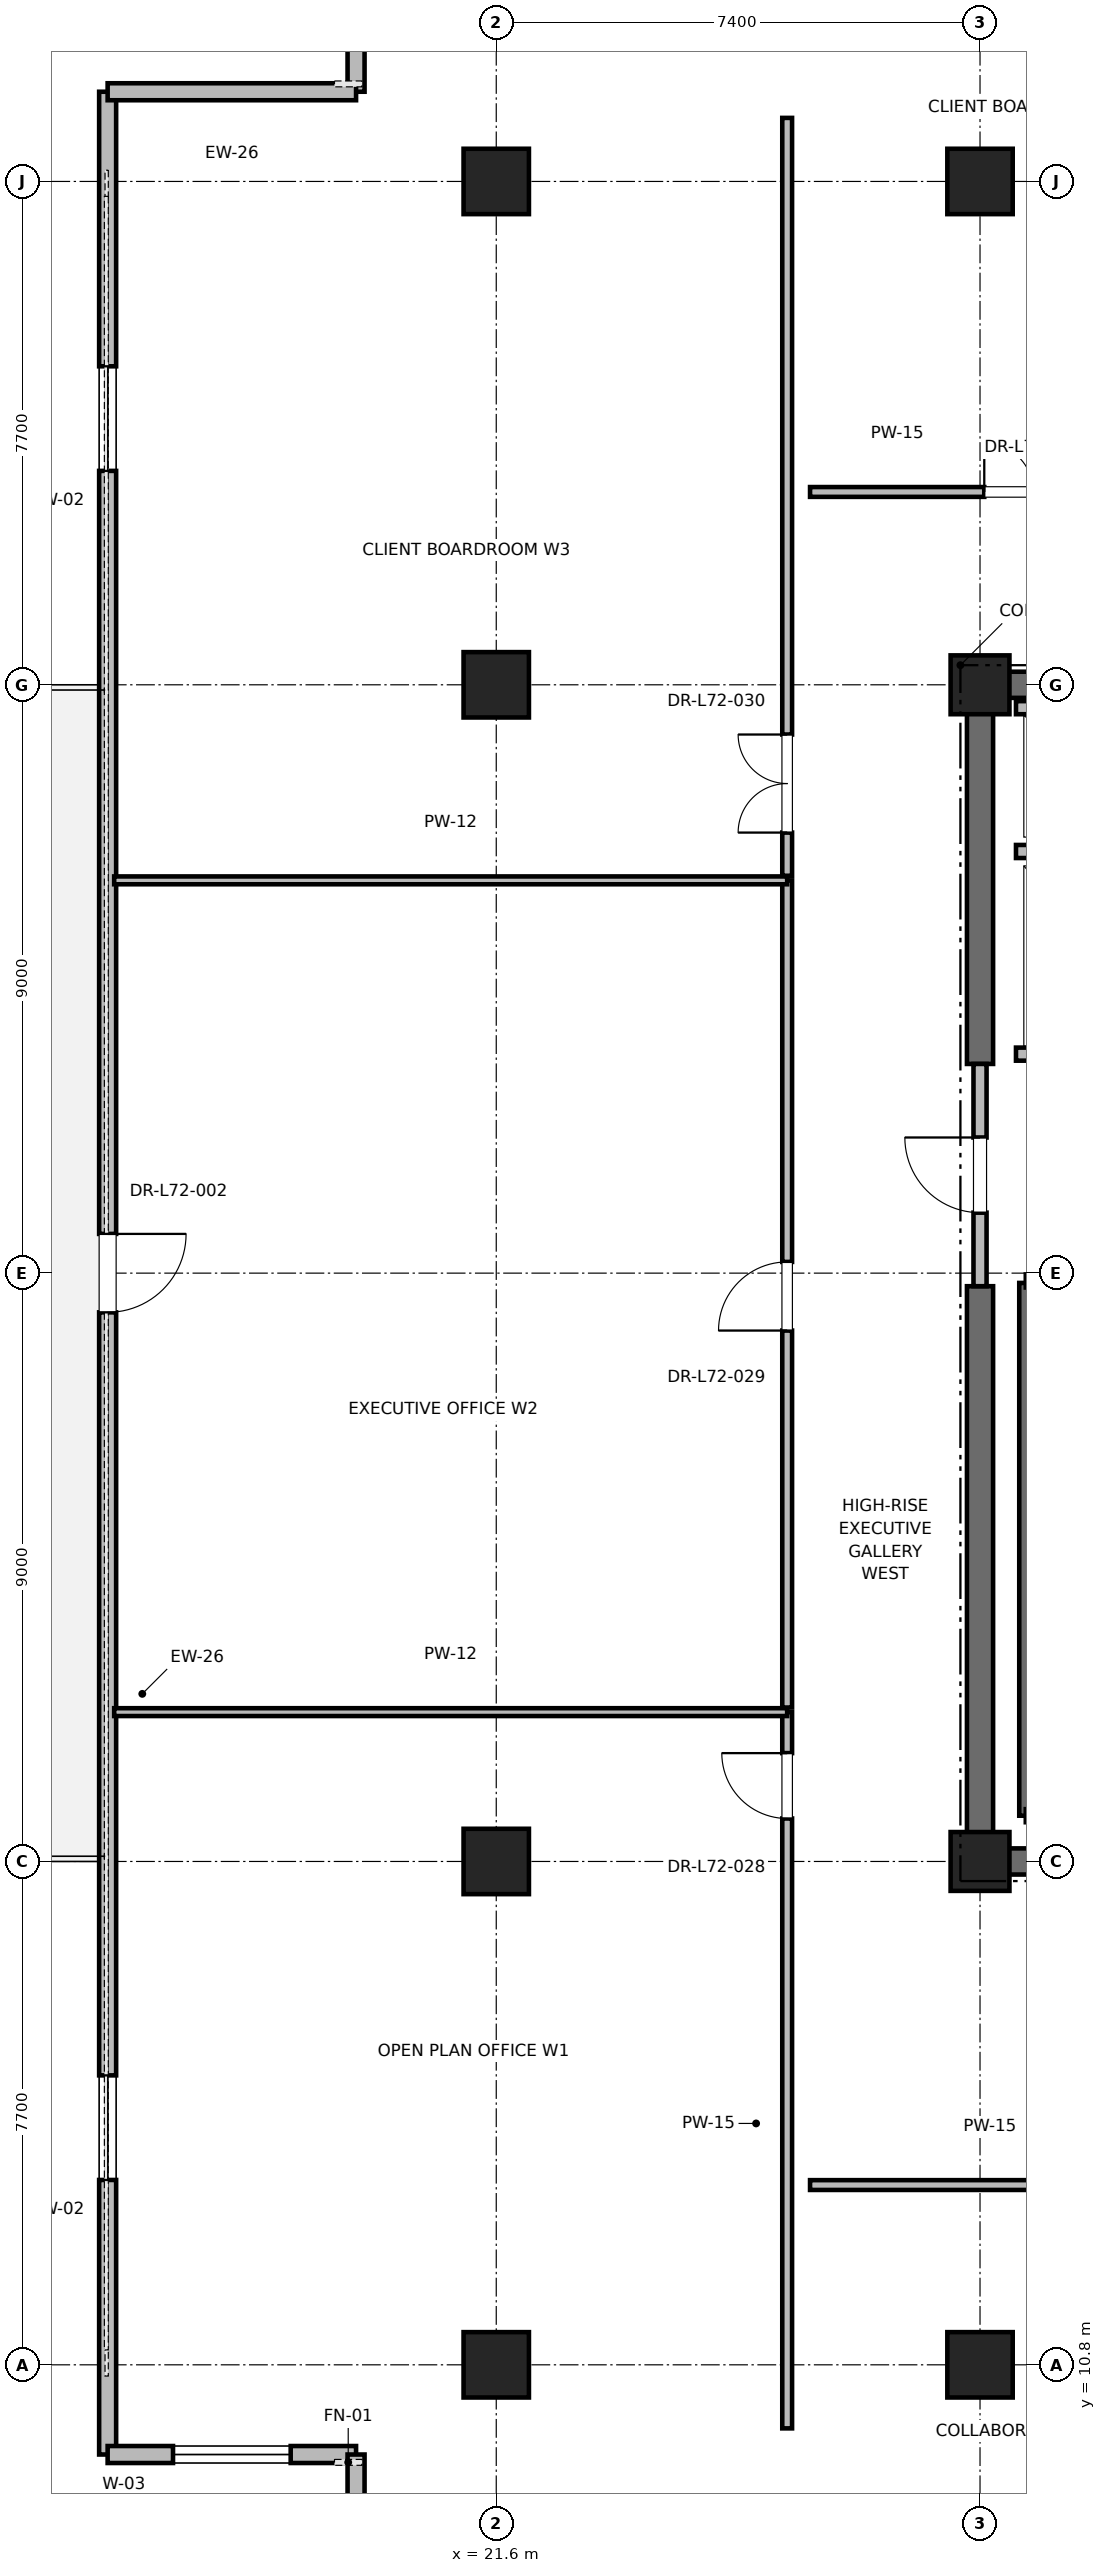
"""IFC4 building model, lengths in metres.
Left out: names, types, materials, properties, quantities, classifications, styles, units other than length and angle.
Written with IfcOpenShell. Run it as: python <this file> out.ifc"""

import sys

from ifc_helpers import new_model, si_unit, direction, frame, frame_2d, origin, origin_2d, place, context, subcontext, project, spatial, rectangle, extrude, element, fill, save


model = new_model("IFC4")
c1 = context("Model", 3, precision=1e-05, world=origin(), true_north=direction((0.0, 1.0)))
c2 = subcontext(c1, "Body", "Model", "MODEL_VIEW")
j1 = project(units=[si_unit("LENGTHUNIT", "METRE"), si_unit("PLANEANGLEUNIT", "RADIAN")], contexts=[c1])
p1 = place(None, origin())
s1 = spatial("IfcSite", under=j1, at=p1, CompositionType="ELEMENT")
p2 = place(p1, origin())
s2 = spatial("IfcBuilding", under=s1, at=p2, CompositionType="ELEMENT")
p3 = place(p2, frame((0.0, 0.0, 310.8)))
s3 = spatial("IfcBuildingStorey", under=s2, at=p3, CompositionType="ELEMENT", Elevation=310.8)
for number, where, z_axis, x_axis in (
    (1, (29.0, 10.8, 0.0), (0.0, 0.0, 1.0), (1.0, 0.0, 0.0)),
    (2, (29.0, 44.2, 0.0), (0.0, 0.0, 1.0), (1.0, 0.0, 0.0)),
    (3, (21.6, 18.5, 0.0), (0.0, 0.0, 1.0), (1.0, 0.0, 0.0)),
    (4, (21.6, 36.5, 0.0), (0.0, 0.0, 1.0), (1.0, 0.0, 0.0)),
    (5, (21.6, 10.8, 0.0), (0.0, 0.0, 1.0), (1.0, 0.0, 0.0)),
    (6, (21.6, 44.2, 0.0), (0.0, 0.0, 1.0), (1.0, 0.0, 0.0)),
):
    element("IfcColumn", number, at=place(p3, frame(where, z_axis=z_axis, x_axis=x_axis)), inside=s3, PredefinedType="COLUMN", context=c2, shape_type="SweptSolid", body=[
        extrude(rectangle(XDim=1.0, YDim=1.0, at=origin_2d()), origin(), (0.0, 0.0, 1.0), 4.0),
    ])
for number, where, z_axis, x_axis in (
    (7, (29.0, 18.5, 0.0), (0.0, 0.0, 1.0), (1.0, 0.0, 0.0)),
    (8, (29.0, 36.5, 0.0), (0.0, 0.0, 1.0), (1.0, 0.0, 0.0)),
):
    element("IfcColumn", number, at=place(p3, frame(where, z_axis=z_axis, x_axis=x_axis)), inside=s3, PredefinedType="PILASTER", context=c2, shape_type="SweptSolid", body=[
        extrude(rectangle(XDim=0.9, YDim=0.9, at=origin_2d()), origin(), (0.0, 0.0, 1.0), 4.0),
    ])
p4 = place(p3, frame((29.0, 18.5, 0.0), z_axis=(0.0, 0.0, 1.0), x_axis=(1.0, 0.0, 0.0)))
e9 = element("IfcWall", 9, at=p4, inside=s3, PredefinedType="SHEAR", context=c2, shape_type="SweptSolid", body=[
    extrude(rectangle(XDim=9.2, YDim=0.4, at=frame_2d((4.6, 0.0))), origin(), (0.0, 0.0, 1.0), 3.785),
])
p5 = place(p3, frame((29.0, 36.5, 0.0), z_axis=(0.0, 0.0, 1.0), x_axis=(1.0, 0.0, 0.0)))
e10 = element("IfcWall", 10, at=p5, inside=s3, PredefinedType="SHEAR", context=c2, shape_type="SweptSolid", body=[
    extrude(rectangle(XDim=5.8, YDim=0.4, at=frame_2d((2.9, 0.0))), origin(), (0.0, 0.0, 1.0), 3.785),
])
p6 = place(p3, frame((29.0, 18.5, 0.0), z_axis=(0.0, 0.0, 1.0), x_axis=(0.0, 1.0, 0.0)))
e11 = element("IfcWall", 11, at=p6, inside=s3, PredefinedType="SHEAR", context=c2, shape_type="SweptSolid", body=[
    extrude(rectangle(XDim=8.8, YDim=0.4, at=frame_2d((4.4, 0.0))), origin(), (0.0, 0.0, 1.0), 3.785),
])
p7 = place(p3, frame((29.0, 30.7, 0.0), z_axis=(0.0, 0.0, 1.0), x_axis=(0.0, 1.0, 0.0)))
e12 = element("IfcWall", 12, at=p7, inside=s3, PredefinedType="SHEAR", context=c2, shape_type="SweptSolid", body=[
    extrude(rectangle(XDim=5.8, YDim=0.4, at=frame_2d((2.9, 0.0))), origin(), (0.0, 0.0, 1.0), 3.785),
])
p8 = place(p3, frame((15.656, 45.572, 0.0), z_axis=(0.0, 0.0, 1.0), x_axis=(0.0, -1.0, 0.0)))
e13 = element("IfcWall", 13, at=p8, inside=s3, PredefinedType="PARAPET", context=c2, shape_type="SweptSolid", body=[
    extrude(rectangle(XDim=36.145, YDim=0.26, at=frame_2d((18.072, 0.0))), origin(), (0.0, 0.0, 1.0), 3.196),
])
p9 = place(p8, frame((4.2, 0.0, 0.85)))
e14 = element("IfcOpeningElement", 14, at=p9, cuts=e13, PredefinedType="OPENING", context=c2, shape_type="SweptSolid", body=[
    extrude(rectangle(XDim=1.6, YDim=2.1, at=frame_2d((0.8, 1.05))), frame((0.0, 0.13, 0.0), z_axis=(0.0, -1.0, 0.0), x_axis=(1.0, 0.0, 0.0)), (0.0, 0.0, 1.0), 0.26),
])
p10 = place(p8, frame((17.472, 0.0, 0.0)))
e15 = element("IfcOpeningElement", 15, at=p10, cuts=e13, PredefinedType="OPENING", context=c2, shape_type="SweptSolid", body=[
    extrude(rectangle(XDim=1.2, YDim=2.2, at=frame_2d((0.6, 1.1))), frame((0.0, 0.13, 0.0), z_axis=(0.0, -1.0, 0.0), x_axis=(1.0, 0.0, 0.0)), (0.0, 0.0, 1.0), 0.26),
])
p11 = place(p8, frame((30.344, 0.0, 0.85)))
e16 = element("IfcOpeningElement", 16, at=p11, cuts=e13, PredefinedType="OPENING", context=c2, shape_type="SweptSolid", body=[
    extrude(rectangle(XDim=1.6, YDim=2.1, at=frame_2d((0.8, 1.05))), frame((0.0, 0.13, 0.0), z_axis=(0.0, -1.0, 0.0), x_axis=(1.0, 0.0, 0.0)), (0.0, 0.0, 1.0), 0.26),
])
p12 = place(p3, frame((15.656, 9.428, 0.0), z_axis=(0.0, 0.0, 1.0), x_axis=(1.0, 0.0, 0.0)))
e17 = element("IfcWall", 17, at=p12, inside=s3, PredefinedType="PARAPET", context=c2, shape_type="SweptSolid", body=[
    extrude(rectangle(XDim=3.8, YDim=0.26, at=frame_2d((1.9, 0.0))), origin(), (0.0, 0.0, 1.0), 3.785),
])
p13 = place(p12, frame((1.0, 0.0, 0.85)))
e18 = element("IfcOpeningElement", 18, at=p13, cuts=e17, PredefinedType="OPENING", context=c2, shape_type="SweptSolid", body=[
    extrude(rectangle(XDim=1.8, YDim=2.2, at=frame_2d((0.9, 1.1))), frame((0.0, 0.13, 0.0), z_axis=(0.0, -1.0, 0.0), x_axis=(1.0, 0.0, 0.0)), (0.0, 0.0, 1.0), 0.26),
])
p14 = place(p3, frame((19.456, 9.428, 0.0), z_axis=(0.0, 0.0, 1.0), x_axis=(0.0, -1.0, 0.0)))
e19 = element("IfcWall", 19, at=p14, inside=s3, PredefinedType="PARAPET", context=c2, shape_type="SweptSolid", body=[
    extrude(rectangle(XDim=3.3, YDim=0.26, at=frame_2d((1.65, 0.0))), origin(), (0.0, 0.0, 1.0), 3.785),
])
p15 = place(p3, frame((19.456, 48.872, 0.0), z_axis=(0.0, 0.0, 1.0), x_axis=(0.0, -1.0, 0.0)))
e20 = element("IfcWall", 20, at=p15, inside=s3, PredefinedType="PARAPET", context=c2, shape_type="SweptSolid", body=[
    extrude(rectangle(XDim=3.3, YDim=0.26, at=frame_2d((1.65, 0.0))), origin(), (0.0, 0.0, 1.0), 3.785),
])
p16 = place(p15, frame((0.75, 0.0, 0.85)))
e21 = element("IfcOpeningElement", 21, at=p16, cuts=e20, PredefinedType="OPENING", context=c2, shape_type="SweptSolid", body=[
    extrude(rectangle(XDim=1.8, YDim=2.2, at=frame_2d((0.9, 1.1))), frame((0.0, 0.13, 0.0), z_axis=(0.0, -1.0, 0.0), x_axis=(1.0, 0.0, 0.0)), (0.0, 0.0, 1.0), 0.26),
])
p17 = place(p3, frame((19.456, 45.572, 0.0), z_axis=(0.0, 0.0, 1.0), x_axis=(-1.0, 0.0, 0.0)))
e22 = element("IfcWall", 22, at=p17, inside=s3, PredefinedType="PARAPET", context=c2, shape_type="SweptSolid", body=[
    extrude(rectangle(XDim=3.8, YDim=0.26, at=frame_2d((1.9, 0.0))), origin(), (0.0, 0.0, 1.0), 3.785),
])
p18 = place(p3, frame((29.7, 19.2, 0.0), z_axis=(0.0, 0.0, 1.0), x_axis=(0.0, 1.0, 0.0)))
e23 = element("IfcWall", 23, at=p18, inside=s3, PredefinedType="SOLIDWALL", context=c2, shape_type="SweptSolid", body=[
    extrude(rectangle(XDim=8.15, YDim=0.2, at=frame_2d((4.075, 0.0))), origin(), (0.0, 0.0, 1.0), 3.785),
])
p19 = place(p3, frame((29.0, 27.3, 0.0), z_axis=(0.0, 0.0, 1.0), x_axis=(0.0, 1.0, 0.0)))
e24 = element("IfcWall", 24, at=p19, inside=s3, PredefinedType="PARTITIONING", context=c2, shape_type="SweptSolid", body=[
    extrude(rectangle(XDim=3.4, YDim=0.2, at=frame_2d((1.7, 0.0))), origin(), (0.0, 0.0, 1.0), 2.865),
])
p20 = place(p19, frame((1.125, 0.0, 0.0)))
e25 = element("IfcOpeningElement", 25, at=p20, cuts=e24, PredefinedType="OPENING", context=c2, shape_type="SweptSolid", body=[
    extrude(rectangle(XDim=1.15, YDim=2.2, at=frame_2d((0.575, 1.1))), frame((0.0, 0.1, 0.0), z_axis=(0.0, -1.0, 0.0), x_axis=(1.0, 0.0, 0.0)), (0.0, 0.0, 1.0), 0.2),
])
p21 = place(p3, frame((29.55, 30.85, 0.0), z_axis=(0.0, 0.0, 1.0), x_axis=(1.0, 0.0, 0.0)))
e26 = element("IfcWall", 26, at=p21, inside=s3, PredefinedType="SOLIDWALL", context=c2, shape_type="SweptSolid", body=[
    extrude(rectangle(XDim=2.6, YDim=0.2, at=frame_2d((1.3, 0.0))), origin(), (0.0, 0.0, 1.0), 2.865),
])
p22 = place(p21, frame((0.75, 0.0, 0.0)))
e27 = element("IfcOpeningElement", 27, at=p22, cuts=e26, PredefinedType="OPENING", context=c2, shape_type="SweptSolid", body=[
    extrude(rectangle(XDim=1.1, YDim=2.2, at=frame_2d((0.55, 1.1))), frame((0.0, 0.1, 0.0), z_axis=(0.0, -1.0, 0.0), x_axis=(1.0, 0.0, 0.0)), (0.0, 0.0, 1.0), 0.2),
])
p23 = place(p3, frame((29.55, 33.95, 0.0), z_axis=(0.0, 0.0, 1.0), x_axis=(1.0, 0.0, 0.0)))
e28 = element("IfcWall", 28, at=p23, inside=s3, PredefinedType="SOLIDWALL", context=c2, shape_type="SweptSolid", body=[
    extrude(rectangle(XDim=2.8, YDim=0.2, at=frame_2d((1.4, 0.0))), origin(), (0.0, 0.0, 1.0), 3.785),
])
p24 = place(p3, frame((32.35, 36.15, 0.0), z_axis=(0.0, 0.0, 1.0), x_axis=(-1.0, 0.0, 0.0)))
e29 = element("IfcWall", 29, at=p24, inside=s3, PredefinedType="SOLIDWALL", context=c2, shape_type="SweptSolid", body=[
    extrude(rectangle(XDim=2.8, YDim=0.2, at=frame_2d((1.4, 0.0))), origin(), (0.0, 0.0, 1.0), 3.22),
])
p25 = place(p3, frame((26.4, 39.45, 0.0), z_axis=(0.0, 0.0, 1.0), x_axis=(1.0, 0.0, 0.0)))
e30 = element("IfcWall", 30, at=p25, inside=s3, PredefinedType="PARTITIONING", context=c2, shape_type="SweptSolid", body=[
    extrude(rectangle(XDim=6.8, YDim=0.15, at=frame_2d((3.4, 0.0))), origin(), (0.0, 0.0, 1.0), 2.85),
])
p26 = place(p25, frame((2.665, 0.0, 0.0)))
e31 = element("IfcOpeningElement", 31, at=p26, cuts=e30, PredefinedType="OPENING", context=c2, shape_type="SweptSolid", body=[
    extrude(rectangle(XDim=1.5, YDim=2.25, at=frame_2d((0.75, 1.125))), frame((0.0, 0.075, 0.0), z_axis=(0.0, -1.0, 0.0), x_axis=(1.0, 0.0, 0.0)), (0.0, 0.0, 1.0), 0.15),
])
p27 = place(p3, frame((26.4, 13.55, 0.0), z_axis=(0.0, 0.0, 1.0), x_axis=(1.0, 0.0, 0.0)))
e32 = element("IfcWall", 32, at=p27, inside=s3, PredefinedType="PARTITIONING", context=c2, shape_type="SweptSolid", body=[
    extrude(rectangle(XDim=11.968, YDim=0.15, at=frame_2d((5.984, 0.0))), origin(), (0.0, 0.0, 1.0), 2.85),
])
p28 = place(p27, frame((5.499, 0.0, 0.0)))
e33 = element("IfcOpeningElement", 33, at=p28, cuts=e32, PredefinedType="OPENING", context=c2, shape_type="SweptSolid", body=[
    extrude(rectangle(XDim=1.0, YDim=2.15, at=frame_2d((0.5, 1.075))), frame((0.0, 0.075, 0.0), z_axis=(0.0, -1.0, 0.0), x_axis=(1.0, 0.0, 0.0)), (0.0, 0.0, 1.0), 0.15),
])
p29 = place(p3, frame((26.05, 9.828, 0.0), z_axis=(0.0, 0.0, 1.0), x_axis=(0.0, 1.0, 0.0)))
e34 = element("IfcWall", 34, at=p29, inside=s3, PredefinedType="PARTITIONING", context=c2, shape_type="SweptSolid", body=[
    extrude(rectangle(XDim=10.957, YDim=0.15, at=frame_2d((5.479, 0.0))), origin(), (0.0, 0.0, 1.0), 2.85),
])
p30 = place(p29, frame((9.33, 0.0, 0.0)))
e35 = element("IfcOpeningElement", 35, at=p30, cuts=e34, PredefinedType="OPENING", context=c2, shape_type="SweptSolid", body=[
    extrude(rectangle(XDim=1.0, YDim=2.15, at=frame_2d((0.5, 1.075))), frame((0.0, 0.075, 0.0), z_axis=(0.0, -1.0, 0.0), x_axis=(1.0, 0.0, 0.0)), (0.0, 0.0, 1.0), 0.15),
])
p31 = place(p3, frame((15.756, 20.785, 0.0), z_axis=(0.0, 0.0, 1.0), x_axis=(1.0, 0.0, 0.0)))
e36 = element("IfcWall", 36, at=p31, inside=s3, PredefinedType="PARTITIONING", context=c2, shape_type="SweptSolid", body=[
    extrude(rectangle(XDim=10.294, YDim=0.12, at=frame_2d((5.147, 0.0))), origin(), (0.0, 0.0, 1.0), 2.85),
])
p32 = place(p3, frame((26.05, 20.854, 0.0), z_axis=(0.0, 0.0, 1.0), x_axis=(0.0, 1.0, 0.0)))
e37 = element("IfcWall", 37, at=p32, inside=s3, PredefinedType="PARTITIONING", context=c2, shape_type="SweptSolid", body=[
    extrude(rectangle(XDim=12.654, YDim=0.15, at=frame_2d((6.327, 0.0))), origin(), (0.0, 0.0, 1.0), 2.85),
])
p33 = place(p32, frame((5.767, 0.0, 0.0)))
e38 = element("IfcOpeningElement", 38, at=p33, cuts=e37, PredefinedType="OPENING", context=c2, shape_type="SweptSolid", body=[
    extrude(rectangle(XDim=1.05, YDim=2.2, at=frame_2d((0.525, 1.1))), frame((0.0, 0.075, 0.0), z_axis=(0.0, -1.0, 0.0), x_axis=(1.0, 0.0, 0.0)), (0.0, 0.0, 1.0), 0.15),
])
p34 = place(p3, frame((15.756, 33.509, 0.0), z_axis=(0.0, 0.0, 1.0), x_axis=(1.0, 0.0, 0.0)))
e39 = element("IfcWall", 39, at=p34, inside=s3, PredefinedType="PARTITIONING", context=c2, shape_type="SweptSolid", body=[
    extrude(rectangle(XDim=10.294, YDim=0.12, at=frame_2d((5.147, 0.0))), origin(), (0.0, 0.0, 1.0), 2.85),
])
p35 = place(p3, frame((26.05, 33.579, 0.0), z_axis=(0.0, 0.0, 1.0), x_axis=(0.0, 1.0, 0.0)))
e40 = element("IfcWall", 40, at=p35, inside=s3, PredefinedType="PARTITIONING", context=c2, shape_type="SweptSolid", body=[
    extrude(rectangle(XDim=11.594, YDim=0.15, at=frame_2d((5.797, 0.0))), origin(), (0.0, 0.0, 1.0), 2.85),
])
p36 = place(p35, frame((0.661, 0.0, 0.0)))
e41 = element("IfcOpeningElement", 41, at=p36, cuts=e40, PredefinedType="OPENING", context=c2, shape_type="SweptSolid", body=[
    extrude(rectangle(XDim=1.5, YDim=2.25, at=frame_2d((0.75, 1.125))), frame((0.0, 0.075, 0.0), z_axis=(0.0, -1.0, 0.0), x_axis=(1.0, 0.0, 0.0)), (0.0, 0.0, 1.0), 0.15),
])
p37 = place(p9, origin())
e42 = element("IfcWindow", 42, at=p37, inside=s3, PartitioningType="SINGLE_PANEL", PredefinedType="WINDOW", context=c2, shape_type="SweptSolid", body=[
    extrude(rectangle(XDim=1.6, YDim=2.1, at=frame_2d((0.8, 1.05))), frame((0.0, 0.03, 0.0), z_axis=(0.0, -1.0, 0.0), x_axis=(1.0, 0.0, 0.0)), (0.0, 0.0, 1.0), 0.06),
])
fill(e14, e42)
p38 = place(p10, origin())
e43 = element("IfcDoor", 43, at=p38, inside=s3, OperationType="SINGLE_SWING_LEFT", PredefinedType="DOOR", context=c2, shape_type="SweptSolid", body=[
    extrude(rectangle(XDim=1.2, YDim=2.2, at=frame_2d((0.6, 1.1))), frame((0.0, 0.025, 0.0), z_axis=(0.0, -1.0, 0.0), x_axis=(1.0, 0.0, 0.0)), (0.0, 0.0, 1.0), 0.05),
])
fill(e15, e43)
p39 = place(p11, origin())
e44 = element("IfcWindow", 44, at=p39, inside=s3, PartitioningType="SINGLE_PANEL", PredefinedType="WINDOW", context=c2, shape_type="SweptSolid", body=[
    extrude(rectangle(XDim=1.6, YDim=2.1, at=frame_2d((0.8, 1.05))), frame((0.0, 0.03, 0.0), z_axis=(0.0, -1.0, 0.0), x_axis=(1.0, 0.0, 0.0)), (0.0, 0.0, 1.0), 0.06),
])
fill(e16, e44)
p40 = place(p13, origin())
e45 = element("IfcWindow", 45, at=p40, inside=s3, PartitioningType="SINGLE_PANEL", PredefinedType="WINDOW", context=c2, shape_type="SweptSolid", body=[
    extrude(rectangle(XDim=1.8, YDim=2.2, at=frame_2d((0.9, 1.1))), frame((0.0, 0.03, 0.0), z_axis=(0.0, -1.0, 0.0), x_axis=(1.0, 0.0, 0.0)), (0.0, 0.0, 1.0), 0.06),
])
fill(e18, e45)
p41 = place(p20, origin())
e46 = element("IfcDoor", 46, at=p41, inside=s3, OperationType="SINGLE_SWING_RIGHT", PredefinedType="DOOR", context=c2, shape_type="SweptSolid", body=[
    extrude(rectangle(XDim=1.15, YDim=2.2, at=frame_2d((0.575, 1.1))), frame((0.0, 0.025, 0.0), z_axis=(0.0, -1.0, 0.0), x_axis=(1.0, 0.0, 0.0)), (0.0, 0.0, 1.0), 0.05),
])
fill(e25, e46)
p42 = place(p26, origin())
e47 = element("IfcDoor", 47, at=p42, inside=s3, OperationType="DOUBLE_DOOR_SINGLE_SWING", PredefinedType="DOOR", context=c2, shape_type="SweptSolid", body=[
    extrude(rectangle(XDim=1.5, YDim=2.25, at=frame_2d((0.75, 1.125))), frame((0.0, 0.025, 0.0), z_axis=(0.0, -1.0, 0.0), x_axis=(1.0, 0.0, 0.0)), (0.0, 0.0, 1.0), 0.05),
])
fill(e31, e47)
p43 = place(p30, origin())
e48 = element("IfcDoor", 48, at=p43, inside=s3, OperationType="SINGLE_SWING_RIGHT", PredefinedType="DOOR", context=c2, shape_type="SweptSolid", body=[
    extrude(rectangle(XDim=1.0, YDim=2.15, at=frame_2d((0.5, 1.075))), frame((0.0, 0.025, 0.0), z_axis=(0.0, -1.0, 0.0), x_axis=(1.0, 0.0, 0.0)), (0.0, 0.0, 1.0), 0.05),
])
fill(e35, e48)
p44 = place(p33, origin())
e49 = element("IfcDoor", 49, at=p44, inside=s3, OperationType="SINGLE_SWING_LEFT", PredefinedType="DOOR", context=c2, shape_type="SweptSolid", body=[
    extrude(rectangle(XDim=1.05, YDim=2.2, at=frame_2d((0.525, 1.1))), frame((0.0, 0.025, 0.0), z_axis=(0.0, -1.0, 0.0), x_axis=(1.0, 0.0, 0.0)), (0.0, 0.0, 1.0), 0.05),
])
fill(e38, e49)
p45 = place(p36, origin())
e50 = element("IfcDoor", 50, at=p45, inside=s3, OperationType="DOUBLE_DOOR_SINGLE_SWING", PredefinedType="DOOR", context=c2, shape_type="SweptSolid", body=[
    extrude(rectangle(XDim=1.5, YDim=2.25, at=frame_2d((0.75, 1.125))), frame((0.0, 0.025, 0.0), z_axis=(0.0, -1.0, 0.0), x_axis=(1.0, 0.0, 0.0)), (0.0, 0.0, 1.0), 0.05),
])
fill(e41, e50)
save(model, sys.argv[1])
